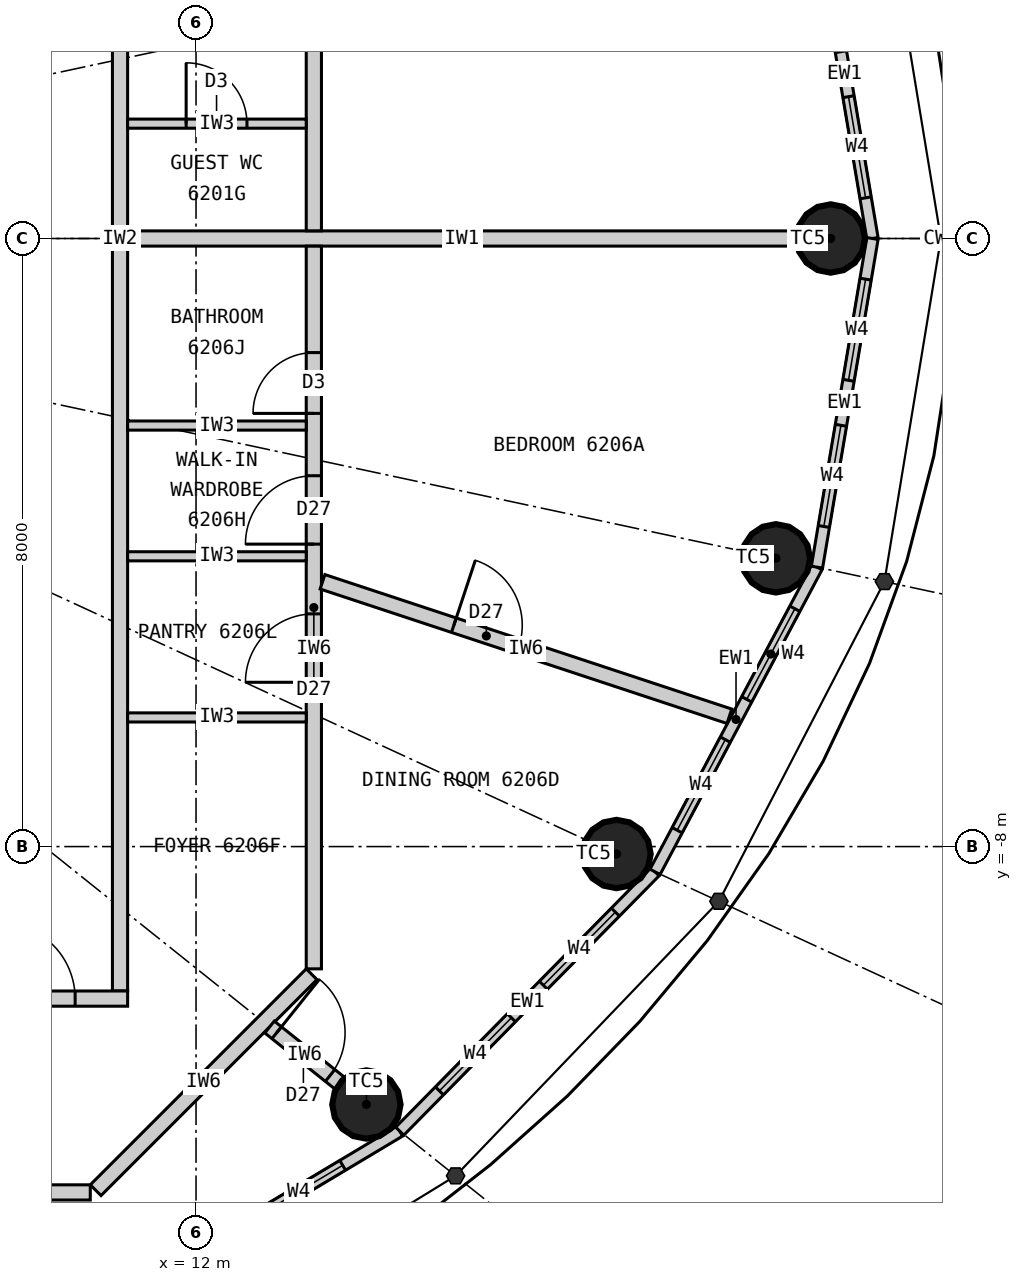
"""IFC4 building model, lengths in metres.
Left out: names, types, materials, properties, quantities, classifications, styles, units other than length and angle.
Written with IfcOpenShell. Run it as: python <this file> out.ifc"""

import sys

from ifc_helpers import new_model, si_unit, direction, frame, frame_2d, origin, origin_2d, place, context, subcontext, project, spatial, rectangle, circle, extrude, clip, halfspace, element, fill, save


model = new_model("IFC4")
c1 = context("Model", 3, precision=1e-05, world=origin(), true_north=direction((0.0, 1.0)))
c2 = subcontext(c1, "Body", "Model", "MODEL_VIEW")
j1 = project(units=[si_unit("LENGTHUNIT", "METRE"), si_unit("PLANEANGLEUNIT", "RADIAN")], contexts=[c1])
p1 = place(None, origin())
s1 = spatial("IfcSite", under=j1, at=p1, CompositionType="ELEMENT")
p2 = place(p1, origin())
s2 = spatial("IfcBuilding", under=s1, at=p2, CompositionType="ELEMENT")
p3 = place(p2, frame((0.0, 0.0, 229.2)))
s3 = spatial("IfcBuildingStorey", under=s2, at=p3, CompositionType="ELEMENT", Elevation=229.2)
for number, where, z_axis, x_axis in (
    (1, (20.35, 0.0, 0.0), (0.0, 0.0, 1.0), (1.0, 0.0, 0.0)),
    (2, (14.241, -11.393, 0.0), (0.0, 0.0, 1.0), (1.0, 0.0, 0.0)),
    (3, (17.532, -8.098, 0.0), (0.0, 0.0, 1.0), (1.0, 0.0, 0.0)),
    (4, (19.629, -4.208, 0.0), (0.0, 0.0, 1.0), (1.0, 0.0, 0.0)),
):
    element("IfcColumn", number, at=place(p3, frame(where, z_axis=z_axis, x_axis=x_axis)), inside=s3, PredefinedType="COLUMN", context=c2, shape_type="Clipping", body=[
        clip(extrude(circle(Radius=0.45, at=origin_2d()), origin(), (0.0, 0.0, 1.0), 3.3), halfspace(frame((0.0, 0.0, 2.25), z_axis=(0.0, 0.0, 1.0), x_axis=(1.0, 0.0, 0.0)), False)),
    ])
p4 = place(p3, frame((20.9, 0.0, 0.0), z_axis=(0.0, 0.0, 1.0), x_axis=(-0.166538513568, 0.986034950445, 0.0)))
e5 = element("IfcWall", 5, at=p4, inside=s3, PredefinedType="ELEMENTEDWALL", context=c2, shape_type="SweptSolid", body=[
    extrude(rectangle(XDim=4.385, YDim=0.15, at=frame_2d((2.192, 0.0))), origin(), (0.0, 0.0, 1.0), 3.05),
])
p5 = place(p4, frame((0.542, 0.0, 0.9)))
e6 = element("IfcOpeningElement", 6, at=p5, cuts=e5, PredefinedType="OPENING", context=c2, shape_type="SweptSolid", body=[
    extrude(rectangle(XDim=1.35, YDim=1.9, at=frame_2d((0.675, 0.95))), frame((0.0, 0.085, 0.0), z_axis=(0.0, -1.0, 0.0), x_axis=(1.0, 0.0, 0.0)), (0.0, 0.0, 1.0), 0.17),
])
p6 = place(p4, frame((2.492, 0.0, 0.9)))
e7 = element("IfcOpeningElement", 7, at=p6, cuts=e5, PredefinedType="OPENING", context=c2, shape_type="SweptSolid", body=[
    extrude(rectangle(XDim=1.35, YDim=1.9, at=frame_2d((0.675, 0.95))), frame((0.0, 0.085, 0.0), z_axis=(0.0, -1.0, 0.0), x_axis=(1.0, 0.0, 0.0)), (0.0, 0.0, 1.0), 0.17),
])
p7 = place(p3, frame((10.346, -14.336, 0.0), z_axis=(0.0, 0.0, 1.0), x_axis=(0.85822150553, 0.513279502265, 0.0)))
e8 = element("IfcWall", 8, at=p7, inside=s3, PredefinedType="ELEMENTEDWALL", context=c2, shape_type="SweptSolid", body=[
    extrude(rectangle(XDim=5.05, YDim=0.15, at=frame_2d((2.525, 0.0))), origin(), (0.0, 0.0, 1.0), 3.05),
])
p8 = place(p7, frame((0.875, 0.0, 0.9)))
e9 = element("IfcOpeningElement", 9, at=p8, cuts=e8, PredefinedType="OPENING", context=c2, shape_type="SweptSolid", body=[
    extrude(rectangle(XDim=1.35, YDim=1.9, at=frame_2d((0.675, 0.95))), frame((0.0, 0.085, 0.0), z_axis=(0.0, -1.0, 0.0), x_axis=(1.0, 0.0, 0.0)), (0.0, 0.0, 1.0), 0.17),
])
p9 = place(p7, frame((2.825, 0.0, 0.9)))
e10 = element("IfcOpeningElement", 10, at=p9, cuts=e8, PredefinedType="OPENING", context=c2, shape_type="SweptSolid", body=[
    extrude(rectangle(XDim=1.35, YDim=1.9, at=frame_2d((0.675, 0.95))), frame((0.0, 0.085, 0.0), z_axis=(0.0, -1.0, 0.0), x_axis=(1.0, 0.0, 0.0)), (0.0, 0.0, 1.0), 0.17),
])
p10 = place(p3, frame((14.68, -11.744, 0.0), z_axis=(0.0, 0.0, 1.0), x_axis=(0.701527379618, 0.712642501993, 0.0)))
e11 = element("IfcWall", 11, at=p10, inside=s3, PredefinedType="ELEMENTEDWALL", context=c2, shape_type="SweptSolid", body=[
    extrude(rectangle(XDim=4.788, YDim=0.15, at=frame_2d((2.394, 0.0))), origin(), (0.0, 0.0, 1.0), 3.05),
])
p11 = place(p10, frame((0.744, 0.0, 0.9)))
e12 = element("IfcOpeningElement", 12, at=p11, cuts=e11, PredefinedType="OPENING", context=c2, shape_type="SweptSolid", body=[
    extrude(rectangle(XDim=1.35, YDim=1.9, at=frame_2d((0.675, 0.95))), frame((0.0, 0.085, 0.0), z_axis=(0.0, -1.0, 0.0), x_axis=(1.0, 0.0, 0.0)), (0.0, 0.0, 1.0), 0.17),
])
p12 = place(p10, frame((2.694, 0.0, 0.9)))
e13 = element("IfcOpeningElement", 13, at=p12, cuts=e11, PredefinedType="OPENING", context=c2, shape_type="SweptSolid", body=[
    extrude(rectangle(XDim=1.35, YDim=1.9, at=frame_2d((0.675, 0.95))), frame((0.0, 0.085, 0.0), z_axis=(0.0, -1.0, 0.0), x_axis=(1.0, 0.0, 0.0)), (0.0, 0.0, 1.0), 0.17),
])
p13 = place(p3, frame((18.04, -8.332, 0.0), z_axis=(0.0, 0.0, 1.0), x_axis=(0.469256152955, 0.883062094597, 0.0)))
e14 = element("IfcWall", 14, at=p13, inside=s3, PredefinedType="ELEMENTEDWALL", context=c2, shape_type="SweptSolid", body=[
    extrude(rectangle(XDim=4.539, YDim=0.15, at=frame_2d((2.27, 0.0))), origin(), (0.0, 0.0, 1.0), 3.05),
])
p14 = place(p13, frame((0.62, 0.0, 0.9)))
e15 = element("IfcOpeningElement", 15, at=p14, cuts=e14, PredefinedType="OPENING", context=c2, shape_type="SweptSolid", body=[
    extrude(rectangle(XDim=1.35, YDim=1.9, at=frame_2d((0.675, 0.95))), frame((0.0, 0.085, 0.0), z_axis=(0.0, -1.0, 0.0), x_axis=(1.0, 0.0, 0.0)), (0.0, 0.0, 1.0), 0.17),
])
p15 = place(p13, frame((2.57, 0.0, 0.9)))
e16 = element("IfcOpeningElement", 16, at=p15, cuts=e14, PredefinedType="OPENING", context=c2, shape_type="SweptSolid", body=[
    extrude(rectangle(XDim=1.35, YDim=1.9, at=frame_2d((0.675, 0.95))), frame((0.0, 0.085, 0.0), z_axis=(0.0, -1.0, 0.0), x_axis=(1.0, 0.0, 0.0)), (0.0, 0.0, 1.0), 0.17),
])
p16 = place(p3, frame((20.17, -4.323, 0.0), z_axis=(0.0, 0.0, 1.0), x_axis=(0.166538513568, 0.986034950445, 0.0)))
e17 = element("IfcWall", 17, at=p16, inside=s3, PredefinedType="ELEMENTEDWALL", context=c2, shape_type="SweptSolid", body=[
    extrude(rectangle(XDim=4.385, YDim=0.15, at=frame_2d((2.192, 0.0))), origin(), (0.0, 0.0, 1.0), 3.05),
])
p17 = place(p16, frame((0.542, 0.0, 0.9)))
e18 = element("IfcOpeningElement", 18, at=p17, cuts=e17, PredefinedType="OPENING", context=c2, shape_type="SweptSolid", body=[
    extrude(rectangle(XDim=1.35, YDim=1.9, at=frame_2d((0.675, 0.95))), frame((0.0, 0.085, 0.0), z_axis=(0.0, -1.0, 0.0), x_axis=(1.0, 0.0, 0.0)), (0.0, 0.0, 1.0), 0.17),
])
p18 = place(p16, frame((2.492, 0.0, 0.9)))
e19 = element("IfcOpeningElement", 19, at=p18, cuts=e17, PredefinedType="OPENING", context=c2, shape_type="SweptSolid", body=[
    extrude(rectangle(XDim=1.35, YDim=1.9, at=frame_2d((0.675, 0.95))), frame((0.0, 0.085, 0.0), z_axis=(0.0, -1.0, 0.0), x_axis=(1.0, 0.0, 0.0)), (0.0, 0.0, 1.0), 0.17),
])
p19 = place(p3, frame((11.0, -9.9, 0.0), z_axis=(0.0, 0.0, 1.0), x_axis=(0.0, 1.0, 0.0)))
e20 = element("IfcWall", 20, at=p19, inside=s3, PredefinedType="PARTITIONING", context=c2, shape_type="SweptSolid", body=[
    extrude(rectangle(XDim=19.8, YDim=0.2, at=frame_2d((9.9, 0.0))), origin(), (0.0, 0.0, 1.0), 3.05),
])
p20 = place(p19, frame((16.096, 0.0, 0.0)))
e21 = element("IfcOpeningElement", 21, at=p20, cuts=e20, PredefinedType="OPENING", context=c2, shape_type="SweptSolid", body=[
    extrude(rectangle(XDim=1.0, YDim=2.2, at=frame_2d((0.5, 1.1))), frame((0.0, 0.11, 0.0), z_axis=(0.0, -1.0, 0.0), x_axis=(1.0, 0.0, 0.0)), (0.0, 0.0, 1.0), 0.22),
])
p21 = place(p3, frame((11.1, -10.0, 0.0), z_axis=(0.0, 0.0, 1.0), x_axis=(-1.0, 0.0, 0.0)))
e22 = element("IfcWall", 22, at=p21, inside=s3, PredefinedType="PARTITIONING", context=c2, shape_type="SweptSolid", body=[
    extrude(rectangle(XDim=12.559, YDim=0.2, at=frame_2d((6.28, 0.0))), origin(), (0.0, 0.0, 1.0), 3.05),
])
p22 = place(p21, frame((0.691, 0.0, 0.0)))
e23 = element("IfcOpeningElement", 23, at=p22, cuts=e22, PredefinedType="OPENING", context=c2, shape_type="SweptSolid", body=[
    extrude(rectangle(XDim=1.0, YDim=2.2, at=frame_2d((0.5, 1.1))), frame((0.0, 0.11, 0.0), z_axis=(0.0, -1.0, 0.0), x_axis=(1.0, 0.0, 0.0)), (0.0, 0.0, 1.0), 0.22),
])
p23 = place(p3, frame((11.1, 0.0, 0.0), z_axis=(0.0, 0.0, 1.0), x_axis=(1.0, 0.0, 0.0)))
e24 = element("IfcWall", 24, at=p23, inside=s3, PredefinedType="PARTITIONING", context=c2, shape_type="SweptSolid", body=[
    extrude(rectangle(XDim=8.8, YDim=0.2, at=frame_2d((4.4, 0.0))), origin(), (0.0, 0.0, 1.0), 2.15),
])
p24 = place(p3, frame((13.55, 0.101, 0.0), z_axis=(0.0, 0.0, 1.0), x_axis=(0.0, 1.0, 0.0)))
e25 = element("IfcWall", 25, at=p24, inside=s3, PredefinedType="PARTITIONING", context=c2, shape_type="SweptSolid", body=[
    extrude(rectangle(XDim=9.508, YDim=0.2, at=frame_2d((4.754, 0.0))), origin(), (0.0, 0.0, 1.0), 3.05),
])
p25 = place(p24, frame((4.32, 0.0, 0.0)))
e26 = element("IfcOpeningElement", 26, at=p25, cuts=e25, PredefinedType="OPENING", context=c2, shape_type="SweptSolid", body=[
    extrude(rectangle(XDim=0.9, YDim=2.1, at=frame_2d((0.45, 1.05))), frame((0.0, 0.11, 0.0), z_axis=(0.0, -1.0, 0.0), x_axis=(1.0, 0.0, 0.0)), (0.0, 0.0, 1.0), 0.22),
])
p26 = place(p3, frame((11.1, 1.511, 0.0), z_axis=(0.0, 0.0, 1.0), x_axis=(1.0, 0.0, 0.0)))
e27 = element("IfcWall", 27, at=p26, inside=s3, PredefinedType="PARTITIONING", context=c2, shape_type="SweptSolid", body=[
    extrude(rectangle(XDim=2.35, YDim=0.12, at=frame_2d((1.175, 0.0))), origin(), (0.0, 0.0, 1.0), 2.3),
])
p27 = place(p26, frame((0.77, 0.0, 0.0)))
e28 = element("IfcOpeningElement", 28, at=p27, cuts=e27, PredefinedType="OPENING", context=c2, shape_type="SweptSolid", body=[
    extrude(rectangle(XDim=0.8, YDim=2.1, at=frame_2d((0.4, 1.05))), frame((0.0, 0.07, 0.0), z_axis=(0.0, -1.0, 0.0), x_axis=(1.0, 0.0, 0.0)), (0.0, 0.0, 1.0), 0.14),
])
p28 = place(p3, frame((4.325, -12.55, 0.0), z_axis=(0.0, 0.0, 1.0), x_axis=(1.0, 0.0, 0.0)))
e29 = element("IfcWall", 29, at=p28, inside=s3, PredefinedType="PARTITIONING", context=c2, shape_type="SweptSolid", body=[
    extrude(rectangle(XDim=6.284, YDim=0.2, at=frame_2d((3.142, 0.0))), origin(), (0.0, 0.0, 1.0), 3.05),
])
p29 = place(p28, frame((2.67, 0.0, 0.0)))
e30 = element("IfcOpeningElement", 30, at=p29, cuts=e29, PredefinedType="OPENING", context=c2, shape_type="SweptSolid", body=[
    extrude(rectangle(XDim=0.9, YDim=2.1, at=frame_2d((0.45, 1.05))), frame((0.0, 0.11, 0.0), z_axis=(0.0, -1.0, 0.0), x_axis=(1.0, 0.0, 0.0)), (0.0, 0.0, 1.0), 0.22),
])
p30 = place(p3, frame((10.679, -12.521, 0.0), z_axis=(0.0, 0.0, 1.0), x_axis=(0.707106781187, 0.707106781187, 0.0)))
e31 = element("IfcWall", 31, at=p30, inside=s3, PredefinedType="PARTITIONING", context=c2, shape_type="SweptSolid", body=[
    extrude(rectangle(XDim=4.019, YDim=0.2, at=frame_2d((2.009, 0.0))), origin(), (0.0, 0.0, 1.0), 3.05),
])
p31 = place(p3, frame((13.55, -9.609, 0.0), z_axis=(0.0, 0.0, 1.0), x_axis=(0.0, 1.0, 0.0)))
e32 = element("IfcWall", 32, at=p31, inside=s3, PredefinedType="PARTITIONING", context=c2, shape_type="SweptSolid", body=[
    extrude(rectangle(XDim=9.508, YDim=0.2, at=frame_2d((4.754, 0.0))), origin(), (0.0, 0.0, 1.0), 3.05),
])
p32 = place(p31, frame((3.77, 0.0, 0.0)))
e33 = element("IfcOpeningElement", 33, at=p32, cuts=e32, PredefinedType="OPENING", context=c2, shape_type="SweptSolid", body=[
    extrude(rectangle(XDim=0.9, YDim=2.1, at=frame_2d((0.45, 1.05))), frame((0.0, 0.11, 0.0), z_axis=(0.0, -1.0, 0.0), x_axis=(1.0, 0.0, 0.0)), (0.0, 0.0, 1.0), 0.22),
])
p33 = place(p31, frame((5.588, 0.0, 0.0)))
e34 = element("IfcOpeningElement", 34, at=p33, cuts=e32, PredefinedType="OPENING", context=c2, shape_type="SweptSolid", body=[
    extrude(rectangle(XDim=0.9, YDim=2.1, at=frame_2d((0.45, 1.05))), frame((0.0, 0.11, 0.0), z_axis=(0.0, -1.0, 0.0), x_axis=(1.0, 0.0, 0.0)), (0.0, 0.0, 1.0), 0.22),
])
p34 = place(p31, frame((7.308, 0.0, 0.0)))
e35 = element("IfcOpeningElement", 35, at=p34, cuts=e32, PredefinedType="OPENING", context=c2, shape_type="SweptSolid", body=[
    extrude(rectangle(XDim=0.8, YDim=2.1, at=frame_2d((0.4, 1.05))), frame((0.0, 0.11, 0.0), z_axis=(0.0, -1.0, 0.0), x_axis=(1.0, 0.0, 0.0)), (0.0, 0.0, 1.0), 0.22),
])
p35 = place(p3, frame((12.968, -10.374, 0.0), z_axis=(0.0, 0.0, 1.0), x_axis=(0.780888968944, -0.624669847345, 0.0)))
e36 = element("IfcWall", 36, at=p35, inside=s3, PredefinedType="PARTITIONING", context=c2, shape_type="SweptSolid", body=[
    extrude(rectangle(XDim=1.181, YDim=0.2, at=frame_2d((0.591, 0.0))), origin(), (0.0, 0.0, 1.0), 2.15),
])
p36 = place(p35, frame((0.12, 0.0, 0.0)))
e37 = element("IfcOpeningElement", 37, at=p36, cuts=e36, PredefinedType="OPENING", context=c2, shape_type="SweptSolid", body=[
    extrude(rectangle(XDim=0.9, YDim=2.1, at=frame_2d((0.45, 1.05))), frame((0.0, 0.11, 0.0), z_axis=(0.0, -1.0, 0.0), x_axis=(1.0, 0.0, 0.0)), (0.0, 0.0, 1.0), 0.22),
])
p37 = place(p3, frame((13.664, -4.516, 0.0), z_axis=(0.0, 0.0, 1.0), x_axis=(0.949481375941, -0.313823384632, 0.0)))
e38 = element("IfcWall", 38, at=p37, inside=s3, PredefinedType="PARTITIONING", context=c2, shape_type="SweptSolid", body=[
    extrude(rectangle(XDim=5.638, YDim=0.2, at=frame_2d((2.819, 0.0))), origin(), (0.0, 0.0, 1.0), 3.05),
])
p38 = place(p37, frame((1.82, 0.0, 0.0)))
e39 = element("IfcOpeningElement", 39, at=p38, cuts=e38, PredefinedType="OPENING", context=c2, shape_type="SweptSolid", body=[
    extrude(rectangle(XDim=0.9, YDim=2.1, at=frame_2d((0.45, 1.05))), frame((0.0, 0.11, 0.0), z_axis=(0.0, -1.0, 0.0), x_axis=(1.0, 0.0, 0.0)), (0.0, 0.0, 1.0), 0.22),
])
for number, where, z_axis, x_axis in (
    (40, (11.1, -6.301, 0.0), (0.0, 0.0, 1.0), (1.0, 0.0, 0.0)),
    (41, (11.1, -4.181, 0.0), (0.0, 0.0, 1.0), (1.0, 0.0, 0.0)),
    (42, (11.1, -2.461, 0.0), (0.0, 0.0, 1.0), (1.0, 0.0, 0.0)),
):
    element("IfcWall", number, at=place(p3, frame(where, z_axis=z_axis, x_axis=x_axis)), inside=s3, PredefinedType="PARTITIONING", context=c2, shape_type="SweptSolid", body=[
        extrude(rectangle(XDim=2.35, YDim=0.12, at=frame_2d((1.175, 0.0))), origin(), (0.0, 0.0, 1.0), 3.05),
    ])
p39 = place(p5, origin())
e43 = element("IfcWindow", 43, at=p39, inside=s3, PartitioningType="SINGLE_PANEL", PredefinedType="WINDOW", context=c2, shape_type="SweptSolid", body=[
    extrude(rectangle(XDim=1.35, YDim=1.9, at=frame_2d((0.675, 0.95))), frame((0.0, 0.03, 0.0), z_axis=(0.0, -1.0, 0.0), x_axis=(1.0, 0.0, 0.0)), (0.0, 0.0, 1.0), 0.06),
])
fill(e6, e43)
p40 = place(p9, origin())
e44 = element("IfcWindow", 44, at=p40, inside=s3, PartitioningType="SINGLE_PANEL", PredefinedType="WINDOW", context=c2, shape_type="SweptSolid", body=[
    extrude(rectangle(XDim=1.35, YDim=1.9, at=frame_2d((0.675, 0.95))), frame((0.0, 0.03, 0.0), z_axis=(0.0, -1.0, 0.0), x_axis=(1.0, 0.0, 0.0)), (0.0, 0.0, 1.0), 0.06),
])
fill(e10, e44)
p41 = place(p11, origin())
e45 = element("IfcWindow", 45, at=p41, inside=s3, PartitioningType="SINGLE_PANEL", PredefinedType="WINDOW", context=c2, shape_type="SweptSolid", body=[
    extrude(rectangle(XDim=1.35, YDim=1.9, at=frame_2d((0.675, 0.95))), frame((0.0, 0.03, 0.0), z_axis=(0.0, -1.0, 0.0), x_axis=(1.0, 0.0, 0.0)), (0.0, 0.0, 1.0), 0.06),
])
fill(e12, e45)
p42 = place(p12, origin())
e46 = element("IfcWindow", 46, at=p42, inside=s3, PartitioningType="SINGLE_PANEL", PredefinedType="WINDOW", context=c2, shape_type="SweptSolid", body=[
    extrude(rectangle(XDim=1.35, YDim=1.9, at=frame_2d((0.675, 0.95))), frame((0.0, 0.03, 0.0), z_axis=(0.0, -1.0, 0.0), x_axis=(1.0, 0.0, 0.0)), (0.0, 0.0, 1.0), 0.06),
])
fill(e13, e46)
p43 = place(p14, origin())
e47 = element("IfcWindow", 47, at=p43, inside=s3, PartitioningType="SINGLE_PANEL", PredefinedType="WINDOW", context=c2, shape_type="SweptSolid", body=[
    extrude(rectangle(XDim=1.35, YDim=1.9, at=frame_2d((0.675, 0.95))), frame((0.0, 0.03, 0.0), z_axis=(0.0, -1.0, 0.0), x_axis=(1.0, 0.0, 0.0)), (0.0, 0.0, 1.0), 0.06),
])
fill(e15, e47)
p44 = place(p15, origin())
e48 = element("IfcWindow", 48, at=p44, inside=s3, PartitioningType="SINGLE_PANEL", PredefinedType="WINDOW", context=c2, shape_type="SweptSolid", body=[
    extrude(rectangle(XDim=1.35, YDim=1.9, at=frame_2d((0.675, 0.95))), frame((0.0, 0.03, 0.0), z_axis=(0.0, -1.0, 0.0), x_axis=(1.0, 0.0, 0.0)), (0.0, 0.0, 1.0), 0.06),
])
fill(e16, e48)
p45 = place(p17, origin())
e49 = element("IfcWindow", 49, at=p45, inside=s3, PartitioningType="SINGLE_PANEL", PredefinedType="WINDOW", context=c2, shape_type="SweptSolid", body=[
    extrude(rectangle(XDim=1.35, YDim=1.9, at=frame_2d((0.675, 0.95))), frame((0.0, 0.03, 0.0), z_axis=(0.0, -1.0, 0.0), x_axis=(1.0, 0.0, 0.0)), (0.0, 0.0, 1.0), 0.06),
])
fill(e18, e49)
p46 = place(p18, origin())
e50 = element("IfcWindow", 50, at=p46, inside=s3, PartitioningType="SINGLE_PANEL", PredefinedType="WINDOW", context=c2, shape_type="SweptSolid", body=[
    extrude(rectangle(XDim=1.35, YDim=1.9, at=frame_2d((0.675, 0.95))), frame((0.0, 0.03, 0.0), z_axis=(0.0, -1.0, 0.0), x_axis=(1.0, 0.0, 0.0)), (0.0, 0.0, 1.0), 0.06),
])
fill(e19, e50)
p47 = place(p27, origin())
e51 = element("IfcDoor", 51, at=p47, inside=s3, OperationType="SINGLE_SWING_LEFT", PredefinedType="DOOR", context=c2, shape_type="SweptSolid", body=[
    extrude(rectangle(XDim=0.8, YDim=2.1, at=frame_2d((0.4, 1.05))), frame((0.0, 0.025, 0.0), z_axis=(0.0, -1.0, 0.0), x_axis=(1.0, 0.0, 0.0)), (0.0, 0.0, 1.0), 0.05),
])
fill(e28, e51)
p48 = place(p22, origin())
e52 = element("IfcDoor", 52, at=p48, inside=s3, OperationType="SINGLE_SWING_RIGHT", PredefinedType="DOOR", context=c2, shape_type="SweptSolid", body=[
    extrude(rectangle(XDim=1.0, YDim=2.2, at=frame_2d((0.5, 1.1))), frame((0.0, 0.025, 0.0), z_axis=(0.0, -1.0, 0.0), x_axis=(1.0, 0.0, 0.0)), (0.0, 0.0, 1.0), 0.05),
])
fill(e23, e52)
p49 = place(p32, origin())
e53 = element("IfcDoor", 53, at=p49, inside=s3, OperationType="SINGLE_SWING_LEFT", PredefinedType="DOOR", context=c2, shape_type="SweptSolid", body=[
    extrude(rectangle(XDim=0.9, YDim=2.1, at=frame_2d((0.45, 1.05))), frame((0.0, 0.025, 0.0), z_axis=(0.0, -1.0, 0.0), x_axis=(1.0, 0.0, 0.0)), (0.0, 0.0, 1.0), 0.05),
])
fill(e33, e53)
p50 = place(p33, origin())
e54 = element("IfcDoor", 54, at=p50, inside=s3, OperationType="SINGLE_SWING_LEFT", PredefinedType="DOOR", context=c2, shape_type="SweptSolid", body=[
    extrude(rectangle(XDim=0.9, YDim=2.1, at=frame_2d((0.45, 1.05))), frame((0.0, 0.025, 0.0), z_axis=(0.0, -1.0, 0.0), x_axis=(1.0, 0.0, 0.0)), (0.0, 0.0, 1.0), 0.05),
])
fill(e34, e54)
p51 = place(p34, origin())
e55 = element("IfcDoor", 55, at=p51, inside=s3, OperationType="SINGLE_SWING_LEFT", PredefinedType="DOOR", context=c2, shape_type="SweptSolid", body=[
    extrude(rectangle(XDim=0.8, YDim=2.1, at=frame_2d((0.4, 1.05))), frame((0.0, 0.025, 0.0), z_axis=(0.0, -1.0, 0.0), x_axis=(1.0, 0.0, 0.0)), (0.0, 0.0, 1.0), 0.05),
])
fill(e35, e55)
p52 = place(p36, origin())
e56 = element("IfcDoor", 56, at=p52, inside=s3, OperationType="SINGLE_SWING_LEFT", PredefinedType="DOOR", context=c2, shape_type="SweptSolid", body=[
    extrude(rectangle(XDim=0.9, YDim=2.1, at=frame_2d((0.45, 1.05))), frame((0.0, 0.025, 0.0), z_axis=(0.0, -1.0, 0.0), x_axis=(1.0, 0.0, 0.0)), (0.0, 0.0, 1.0), 0.05),
])
fill(e37, e56)
p53 = place(p38, origin())
e57 = element("IfcDoor", 57, at=p53, inside=s3, OperationType="SINGLE_SWING_LEFT", PredefinedType="DOOR", context=c2, shape_type="SweptSolid", body=[
    extrude(rectangle(XDim=0.9, YDim=2.1, at=frame_2d((0.45, 1.05))), frame((0.0, 0.025, 0.0), z_axis=(0.0, -1.0, 0.0), x_axis=(1.0, 0.0, 0.0)), (0.0, 0.0, 1.0), 0.05),
])
fill(e39, e57)
save(model, sys.argv[1])
